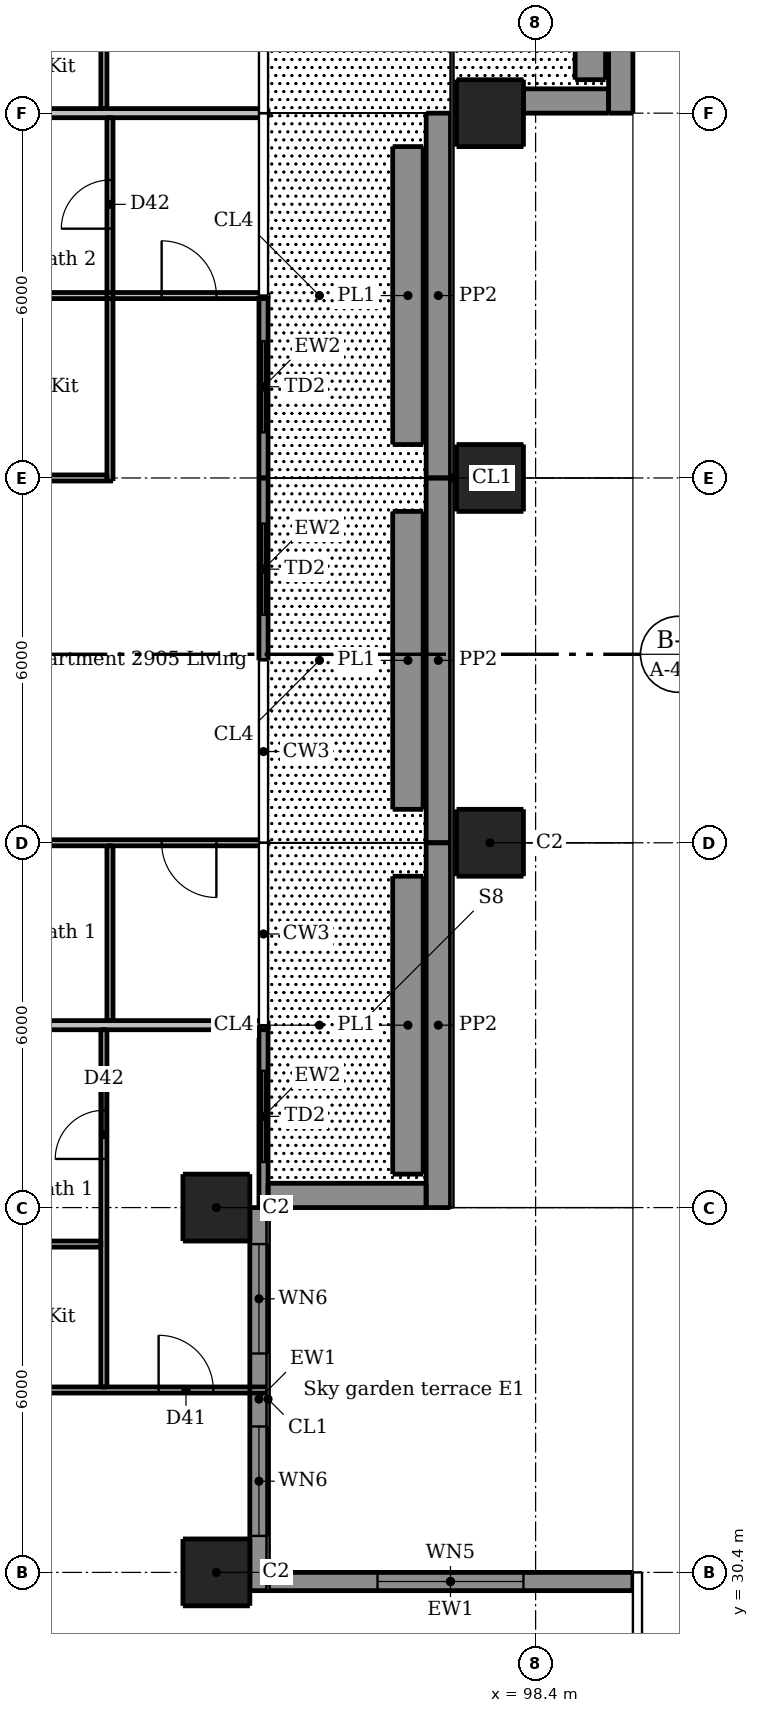
"""IFC4 building model, lengths in metres.
Left out: names, types, materials, properties, quantities, classifications, styles, units other than length and angle.
Written with IfcOpenShell. Run it as: python <this file> out.ifc"""

import sys

from ifc_helpers import new_model, si_unit, direction, frame, frame_2d, origin, origin_2d, place, context, subcontext, project, spatial, rectangle, extrude, element, fill, save


model = new_model("IFC4")
c1 = context("Model", 3, precision=1e-05, world=origin(), true_north=direction((0.0, 1.0)))
c2 = subcontext(c1, "Body", "Model", "MODEL_VIEW")
j1 = project(units=[si_unit("LENGTHUNIT", "METRE"), si_unit("PLANEANGLEUNIT", "RADIAN")], contexts=[c1])
p1 = place(None, origin())
s1 = spatial("IfcSite", under=j1, at=p1, CompositionType="ELEMENT")
p2 = place(p1, origin())
s2 = spatial("IfcBuilding", under=s1, at=p2, CompositionType="ELEMENT")
p3 = place(p2, frame((0.0, 0.0, 108.4)))
s3 = spatial("IfcBuildingStorey", under=s2, at=p3, CompositionType="ELEMENT", Elevation=108.4)
for number, where, z_axis, x_axis in (
    (1, (93.15, 30.4, 0.0), (0.0, 0.0, 1.0), (1.0, 0.0, 0.0)),
    (2, (93.15, 36.4, 0.0), (0.0, 0.0, 1.0), (1.0, 0.0, 0.0)),
):
    element("IfcColumn", number, at=place(p3, frame(where, z_axis=z_axis, x_axis=x_axis)), inside=s3, PredefinedType="COLUMN", context=c2, shape_type="SweptSolid", body=[
        extrude(rectangle(XDim=1.1, YDim=1.1, at=origin_2d()), origin(), (0.0, 0.0, 1.0), 3.05),
    ])
for number, where, z_axis, x_axis in (
    (3, (97.65, 42.4, 0.0), (0.0, 0.0, 1.0), (1.0, 0.0, 0.0)),
    (4, (97.65, 48.4, 0.0), (0.0, 0.0, 1.0), (1.0, 0.0, 0.0)),
    (5, (97.65, 54.4, 0.0), (0.0, 0.0, 1.0), (1.0, 0.0, 0.0)),
):
    element("IfcColumn", number, at=place(p3, frame(where, z_axis=z_axis, x_axis=x_axis)), inside=s3, PredefinedType="COLUMN", context=c2, shape_type="SweptSolid", body=[
        extrude(rectangle(XDim=1.1, YDim=1.1, at=origin_2d()), origin(), (0.0, 0.0, 1.0), 3.3),
    ])
p4 = place(p3, frame((100.0, 30.25, 0.0), z_axis=(0.0, 0.0, 1.0), x_axis=(-1.0, 0.0, 0.0)))
e6 = element("IfcWall", 6, at=p4, inside=s3, PredefinedType="SOLIDWALL", context=c2, shape_type="SweptSolid", body=[
    extrude(rectangle(XDim=6.0, YDim=0.3, at=frame_2d((3.0, 0.0))), origin(), (0.0, 0.0, 1.0), 3.05),
])
p5 = place(p4, frame((1.8, 0.0, 0.15)))
e7 = element("IfcOpeningElement", 7, at=p5, cuts=e6, PredefinedType="OPENING", context=c2, shape_type="SweptSolid", body=[
    extrude(rectangle(XDim=2.4, YDim=2.1, at=frame_2d((1.2, 1.05))), frame((0.0, 0.16, 0.0), z_axis=(0.0, -1.0, 0.0), x_axis=(1.0, 0.0, 0.0)), (0.0, 0.0, 1.0), 0.32),
])
p6 = place(p3, frame((93.85, 30.1, 0.0), z_axis=(0.0, 0.0, 1.0), x_axis=(0.0, 1.0, 0.0)))
e8 = element("IfcWall", 8, at=p6, inside=s3, PredefinedType="SOLIDWALL", context=c2, shape_type="SweptSolid", body=[
    extrude(rectangle(XDim=6.3, YDim=0.3, at=frame_2d((3.15, 0.0))), origin(), (0.0, 0.0, 1.0), 3.05),
])
p7 = place(p6, frame((0.9, 0.0, 0.15)))
e9 = element("IfcOpeningElement", 9, at=p7, cuts=e8, PredefinedType="OPENING", context=c2, shape_type="SweptSolid", body=[
    extrude(rectangle(XDim=1.8, YDim=2.1, at=frame_2d((0.9, 1.05))), frame((0.0, 0.16, 0.0), z_axis=(0.0, -1.0, 0.0), x_axis=(1.0, 0.0, 0.0)), (0.0, 0.0, 1.0), 0.32),
])
p8 = place(p6, frame((3.9, 0.0, 0.15)))
e10 = element("IfcOpeningElement", 10, at=p8, cuts=e8, PredefinedType="OPENING", context=c2, shape_type="SweptSolid", body=[
    extrude(rectangle(XDim=1.8, YDim=2.1, at=frame_2d((0.9, 1.05))), frame((0.0, 0.16, 0.0), z_axis=(0.0, -1.0, 0.0), x_axis=(1.0, 0.0, 0.0)), (0.0, 0.0, 1.0), 0.32),
])
p9 = place(p3, frame((93.925, 36.4, 0.0), z_axis=(0.0, 0.0, 1.0), x_axis=(0.0, 1.0, 0.0)))
e11 = element("IfcWall", 11, at=p9, inside=s3, PredefinedType="SOLIDWALL", context=c2, shape_type="SweptSolid", body=[
    extrude(rectangle(XDim=3.0, YDim=0.15, at=frame_2d((1.5, 0.0))), origin(), (0.0, 0.0, 1.0), 3.05),
])
p10 = place(p9, frame((0.75, 0.0, 0.0)))
e12 = element("IfcOpeningElement", 12, at=p10, cuts=e11, PredefinedType="OPENING", context=c2, shape_type="SweptSolid", body=[
    extrude(rectangle(XDim=1.5, YDim=2.4, at=frame_2d((0.75, 1.2))), frame((0.0, 0.085, 0.0), z_axis=(0.0, -1.0, 0.0), x_axis=(1.0, 0.0, 0.0)), (0.0, 0.0, 1.0), 0.17),
])
p11 = place(p3, frame((93.925, 45.4, 0.0), z_axis=(0.0, 0.0, 1.0), x_axis=(0.0, 1.0, 0.0)))
e13 = element("IfcWall", 13, at=p11, inside=s3, PredefinedType="SOLIDWALL", context=c2, shape_type="SweptSolid", body=[
    extrude(rectangle(XDim=3.0, YDim=0.15, at=frame_2d((1.5, 0.0))), origin(), (0.0, 0.0, 1.0), 3.05),
])
p12 = place(p11, frame((0.75, 0.0, 0.0)))
e14 = element("IfcOpeningElement", 14, at=p12, cuts=e13, PredefinedType="OPENING", context=c2, shape_type="SweptSolid", body=[
    extrude(rectangle(XDim=1.5, YDim=2.4, at=frame_2d((0.75, 1.2))), frame((0.0, 0.085, 0.0), z_axis=(0.0, -1.0, 0.0), x_axis=(1.0, 0.0, 0.0)), (0.0, 0.0, 1.0), 0.17),
])
p13 = place(p3, frame((93.925, 48.4, 0.0), z_axis=(0.0, 0.0, 1.0), x_axis=(0.0, 1.0, 0.0)))
e15 = element("IfcWall", 15, at=p13, inside=s3, PredefinedType="SOLIDWALL", context=c2, shape_type="SweptSolid", body=[
    extrude(rectangle(XDim=3.0, YDim=0.15, at=frame_2d((1.5, 0.0))), origin(), (0.0, 0.0, 1.0), 3.05),
])
p14 = place(p13, frame((0.75, 0.0, 0.0)))
e16 = element("IfcOpeningElement", 16, at=p14, cuts=e15, PredefinedType="OPENING", context=c2, shape_type="SweptSolid", body=[
    extrude(rectangle(XDim=1.5, YDim=2.4, at=frame_2d((0.75, 1.2))), frame((0.0, 0.085, 0.0), z_axis=(0.0, -1.0, 0.0), x_axis=(1.0, 0.0, 0.0)), (0.0, 0.0, 1.0), 0.17),
])
p15 = place(p3, frame((96.8, 36.4, 0.03), z_axis=(0.0, 0.0, 1.0), x_axis=(0.0, 1.0, 0.0)))
e17 = element("IfcWall", 17, at=p15, inside=s3, PredefinedType="PARAPET", context=c2, shape_type="SweptSolid", body=[
    extrude(rectangle(XDim=6.0, YDim=0.4, at=frame_2d((3.0, 0.0))), origin(), (0.0, 0.0, 1.0), 1.1),
])
p16 = place(p3, frame((94.0, 36.6, 0.03), z_axis=(0.0, 0.0, 1.0), x_axis=(1.0, 0.0, 0.0)))
e18 = element("IfcWall", 18, at=p16, inside=s3, PredefinedType="PARAPET", context=c2, shape_type="SweptSolid", body=[
    extrude(rectangle(XDim=2.6, YDim=0.4, at=frame_2d((1.3, 0.0))), origin(), (0.0, 0.0, 1.0), 1.1),
])
p17 = place(p3, frame((96.3, 36.95, 0.03), z_axis=(0.0, 0.0, 1.0), x_axis=(0.0, 1.0, 0.0)))
e19 = element("IfcWall", 19, at=p17, inside=s3, PredefinedType="SOLIDWALL", context=c2, shape_type="SweptSolid", body=[
    extrude(rectangle(XDim=4.9, YDim=0.5, at=frame_2d((2.45, 0.0))), origin(), (0.0, 0.0, 1.0), 0.6),
])
p18 = place(p3, frame((96.8, 42.4, 0.03), z_axis=(0.0, 0.0, 1.0), x_axis=(0.0, 1.0, 0.0)))
e20 = element("IfcWall", 20, at=p18, inside=s3, PredefinedType="PARAPET", context=c2, shape_type="SweptSolid", body=[
    extrude(rectangle(XDim=6.0, YDim=0.4, at=frame_2d((3.0, 0.0))), origin(), (0.0, 0.0, 1.0), 1.1),
])
p19 = place(p3, frame((96.3, 42.95, 0.03), z_axis=(0.0, 0.0, 1.0), x_axis=(0.0, 1.0, 0.0)))
e21 = element("IfcWall", 21, at=p19, inside=s3, PredefinedType="SOLIDWALL", context=c2, shape_type="SweptSolid", body=[
    extrude(rectangle(XDim=4.9, YDim=0.5, at=frame_2d((2.45, 0.0))), origin(), (0.0, 0.0, 1.0), 0.6),
])
p20 = place(p3, frame((96.8, 48.4, 0.03), z_axis=(0.0, 0.0, 1.0), x_axis=(0.0, 1.0, 0.0)))
e22 = element("IfcWall", 22, at=p20, inside=s3, PredefinedType="PARAPET", context=c2, shape_type="SweptSolid", body=[
    extrude(rectangle(XDim=6.0, YDim=0.4, at=frame_2d((3.0, 0.0))), origin(), (0.0, 0.0, 1.0), 1.1),
])
p21 = place(p3, frame((96.3, 48.95, 0.03), z_axis=(0.0, 0.0, 1.0), x_axis=(0.0, 1.0, 0.0)))
e23 = element("IfcWall", 23, at=p21, inside=s3, PredefinedType="SOLIDWALL", context=c2, shape_type="SweptSolid", body=[
    extrude(rectangle(XDim=4.9, YDim=0.5, at=frame_2d((2.45, 0.0))), origin(), (0.0, 0.0, 1.0), 0.6),
])
p22 = place(p3, frame((99.8, 54.4, 0.03), z_axis=(0.0, 0.0, 1.0), x_axis=(0.0, 1.0, 0.0)))
e24 = element("IfcWall", 24, at=p22, inside=s3, PredefinedType="PARAPET", context=c2, shape_type="SweptSolid", body=[
    extrude(rectangle(XDim=5.45, YDim=0.4, at=frame_2d((2.725, 0.0))), origin(), (0.0, 0.0, 1.0), 1.1),
])
p23 = place(p3, frame((98.2, 54.6, 0.03), z_axis=(0.0, 0.0, 1.0), x_axis=(1.0, 0.0, 0.0)))
e25 = element("IfcWall", 25, at=p23, inside=s3, PredefinedType="PARAPET", context=c2, shape_type="SweptSolid", body=[
    extrude(rectangle(XDim=1.4, YDim=0.4, at=frame_2d((0.7, 0.0))), origin(), (0.0, 0.0, 1.0), 1.1),
])
p24 = place(p3, frame((99.3, 54.95, 0.03), z_axis=(0.0, 0.0, 1.0), x_axis=(0.0, 1.0, 0.0)))
e26 = element("IfcWall", 26, at=p24, inside=s3, PredefinedType="SOLIDWALL", context=c2, shape_type="SweptSolid", body=[
    extrude(rectangle(XDim=4.9, YDim=0.5, at=frame_2d((2.45, 0.0))), origin(), (0.0, 0.0, 1.0), 0.6),
])
p25 = place(p3, frame((91.3, 33.45, 0.0), z_axis=(0.0, 0.0, 1.0), x_axis=(0.0, 1.0, 0.0)))
e27 = element("IfcWall", 27, at=p25, inside=s3, PredefinedType="PARTITIONING", context=c2, shape_type="SweptSolid", body=[
    extrude(rectangle(XDim=5.875, YDim=0.1, at=frame_2d((2.938, 0.0))), origin(), (0.0, 0.0, 1.0), 3.05),
])
p26 = place(p25, frame((3.75, 0.0, 0.0)))
e28 = element("IfcOpeningElement", 28, at=p26, cuts=e27, PredefinedType="OPENING", context=c2, shape_type="SweptSolid", body=[
    extrude(rectangle(XDim=0.8, YDim=2.1, at=frame_2d((0.4, 1.05))), frame((0.0, 0.06, 0.0), z_axis=(0.0, -1.0, 0.0), x_axis=(1.0, 0.0, 0.0)), (0.0, 0.0, 1.0), 0.12),
])
p27 = place(p3, frame((91.3, 54.475, 0.0), z_axis=(0.0, 0.0, 1.0), x_axis=(0.0, 1.0, 0.0)))
e29 = element("IfcWall", 29, at=p27, inside=s3, PredefinedType="PARTITIONING", context=c2, shape_type="SweptSolid", body=[
    extrude(rectangle(XDim=2.075, YDim=0.1, at=frame_2d((1.038, 0.0))), origin(), (0.0, 0.0, 1.0), 3.05),
])
p28 = place(p3, frame((91.4, 39.475, 0.0), z_axis=(0.0, 0.0, 1.0), x_axis=(0.0, 1.0, 0.0)))
e30 = element("IfcWall", 30, at=p28, inside=s3, PredefinedType="PARTITIONING", context=c2, shape_type="SweptSolid", body=[
    extrude(rectangle(XDim=2.875, YDim=0.1, at=frame_2d((1.438, 0.0))), origin(), (0.0, 0.0, 1.0), 3.05),
])
p29 = place(p3, frame((91.4, 48.35, 0.0), z_axis=(0.0, 0.0, 1.0), x_axis=(0.0, 1.0, 0.0)))
e31 = element("IfcWall", 31, at=p29, inside=s3, PredefinedType="PARTITIONING", context=c2, shape_type="SweptSolid", body=[
    extrude(rectangle(XDim=5.975, YDim=0.1, at=frame_2d((2.987, 0.0))), origin(), (0.0, 0.0, 1.0), 3.05),
])
p30 = place(p29, frame((4.15, 0.0, 0.0)))
e32 = element("IfcOpeningElement", 32, at=p30, cuts=e31, PredefinedType="OPENING", context=c2, shape_type="SweptSolid", body=[
    extrude(rectangle(XDim=0.8, YDim=2.1, at=frame_2d((0.4, 1.05))), frame((0.0, 0.06, 0.0), z_axis=(0.0, -1.0, 0.0), x_axis=(1.0, 0.0, 0.0)), (0.0, 0.0, 1.0), 0.12),
])
p31 = place(p3, frame((88.375, 51.4, 0.0), z_axis=(0.0, 0.0, 1.0), x_axis=(1.0, 0.0, 0.0)))
e33 = element("IfcWall", 33, at=p31, inside=s3, PredefinedType="PARTITIONING", context=c2, shape_type="SweptSolid", body=[
    extrude(rectangle(XDim=5.625, YDim=0.1, at=frame_2d((2.812, 0.0))), origin(), (0.0, 0.0, 1.0), 3.05),
])
p32 = place(p31, frame((3.875, 0.0, 0.0)))
e34 = element("IfcOpeningElement", 34, at=p32, cuts=e33, PredefinedType="OPENING", context=c2, shape_type="SweptSolid", body=[
    extrude(rectangle(XDim=0.9, YDim=2.1, at=frame_2d((0.45, 1.05))), frame((0.0, 0.06, 0.0), z_axis=(0.0, -1.0, 0.0), x_axis=(1.0, 0.0, 0.0)), (0.0, 0.0, 1.0), 0.12),
])
p33 = place(p3, frame((88.375, 48.4, 0.0), z_axis=(0.0, 0.0, 1.0), x_axis=(1.0, 0.0, 0.0)))
e35 = element("IfcWall", 35, at=p33, inside=s3, PredefinedType="PARTITIONING", context=c2, shape_type="SweptSolid", body=[
    extrude(rectangle(XDim=2.975, YDim=0.1, at=frame_2d((1.488, 0.0))), origin(), (0.0, 0.0, 1.0), 2.516),
])
p34 = place(p33, frame((1.025, 0.0, 0.0)))
e36 = element("IfcOpeningElement", 36, at=p34, cuts=e35, PredefinedType="OPENING", context=c2, shape_type="SweptSolid", body=[
    extrude(rectangle(XDim=0.9, YDim=2.1, at=frame_2d((0.45, 1.05))), frame((0.0, 0.06, 0.0), z_axis=(0.0, -1.0, 0.0), x_axis=(1.0, 0.0, 0.0)), (0.0, 0.0, 1.0), 0.12),
])
p35 = place(p3, frame((94.0, 42.4, 0.0), z_axis=(0.0, 0.0, 1.0), x_axis=(-1.0, 0.0, 0.0)))
e37 = element("IfcWall", 37, at=p35, inside=s3, PredefinedType="PARTITIONING", context=c2, shape_type="SweptSolid", body=[
    extrude(rectangle(XDim=5.625, YDim=0.1, at=frame_2d((2.812, 0.0))), origin(), (0.0, 0.0, 1.0), 2.516),
])
p36 = place(p35, frame((0.85, 0.0, 0.0)))
e38 = element("IfcOpeningElement", 38, at=p36, cuts=e37, PredefinedType="OPENING", context=c2, shape_type="SweptSolid", body=[
    extrude(rectangle(XDim=0.9, YDim=2.1, at=frame_2d((0.45, 1.05))), frame((0.0, 0.06, 0.0), z_axis=(0.0, -1.0, 0.0), x_axis=(1.0, 0.0, 0.0)), (0.0, 0.0, 1.0), 0.12),
])
p37 = place(p35, frame((3.75, 0.0, 0.0)))
e39 = element("IfcOpeningElement", 39, at=p37, cuts=e37, PredefinedType="OPENING", context=c2, shape_type="SweptSolid", body=[
    extrude(rectangle(XDim=0.8, YDim=2.1, at=frame_2d((0.4, 1.05))), frame((0.0, 0.06, 0.0), z_axis=(0.0, -1.0, 0.0), x_axis=(1.0, 0.0, 0.0)), (0.0, 0.0, 1.0), 0.12),
])
p38 = place(p3, frame((88.375, 35.8, 0.0), z_axis=(0.0, 0.0, 1.0), x_axis=(1.0, 0.0, 0.0)))
e40 = element("IfcWall", 40, at=p38, inside=s3, PredefinedType="PARTITIONING", context=c2, shape_type="SweptSolid", body=[
    extrude(rectangle(XDim=2.875, YDim=0.1, at=frame_2d((1.438, 0.0))), origin(), (0.0, 0.0, 1.0), 3.05),
])
p39 = place(p3, frame((88.375, 33.4, 0.0), z_axis=(0.0, 0.0, 1.0), x_axis=(1.0, 0.0, 0.0)))
e41 = element("IfcWall", 41, at=p39, inside=s3, PredefinedType="PARTITIONING", context=c2, shape_type="SweptSolid", body=[
    extrude(rectangle(XDim=5.625, YDim=0.1, at=frame_2d((2.812, 0.0))), origin(), (0.0, 0.0, 1.0), 3.05),
])
p40 = place(p39, frame((0.975, 0.0, 0.0)))
e42 = element("IfcOpeningElement", 42, at=p40, cuts=e41, PredefinedType="OPENING", context=c2, shape_type="SweptSolid", body=[
    extrude(rectangle(XDim=0.9, YDim=2.1, at=frame_2d((0.45, 1.05))), frame((0.0, 0.06, 0.0), z_axis=(0.0, -1.0, 0.0), x_axis=(1.0, 0.0, 0.0)), (0.0, 0.0, 1.0), 0.12),
])
p41 = place(p39, frame((3.825, 0.0, 0.0)))
e43 = element("IfcOpeningElement", 43, at=p41, cuts=e41, PredefinedType="OPENING", context=c2, shape_type="SweptSolid", body=[
    extrude(rectangle(XDim=0.9, YDim=2.1, at=frame_2d((0.45, 1.05))), frame((0.0, 0.06, 0.0), z_axis=(0.0, -1.0, 0.0), x_axis=(1.0, 0.0, 0.0)), (0.0, 0.0, 1.0), 0.12),
])
p42 = place(p3, frame((88.375, 54.4, 0.0), z_axis=(0.0, 0.0, 1.0), x_axis=(1.0, 0.0, 0.0)))
e44 = element("IfcWall", 44, at=p42, inside=s3, PredefinedType="PARTITIONING", context=c2, shape_type="SweptSolid", body=[
    extrude(rectangle(XDim=5.625, YDim=0.15, at=frame_2d((2.812, 0.0))), origin(), (0.0, 0.0, 1.0), 2.516),
])
p43 = place(p3, frame((88.375, 39.4, 0.0), z_axis=(0.0, 0.0, 1.0), x_axis=(1.0, 0.0, 0.0)))
e45 = element("IfcWall", 45, at=p43, inside=s3, PredefinedType="PARTITIONING", context=c2, shape_type="SweptSolid", body=[
    extrude(rectangle(XDim=5.625, YDim=0.15, at=frame_2d((2.812, 0.0))), origin(), (0.0, 0.0, 1.0), 3.05),
])
p44 = place(p5, origin())
e46 = element("IfcWindow", 46, at=p44, inside=s3, PartitioningType="DOUBLE_PANEL_VERTICAL", PredefinedType="WINDOW", context=c2, shape_type="SweptSolid", body=[
    extrude(rectangle(XDim=2.4, YDim=2.1, at=frame_2d((1.2, 1.05))), frame((0.0, 0.03, 0.0), z_axis=(0.0, -1.0, 0.0), x_axis=(1.0, 0.0, 0.0)), (0.0, 0.0, 1.0), 0.06),
])
fill(e7, e46)
p45 = place(p7, origin())
e47 = element("IfcWindow", 47, at=p45, inside=s3, PartitioningType="DOUBLE_PANEL_VERTICAL", PredefinedType="WINDOW", context=c2, shape_type="SweptSolid", body=[
    extrude(rectangle(XDim=1.8, YDim=2.1, at=frame_2d((0.9, 1.05))), frame((0.0, 0.03, 0.0), z_axis=(0.0, -1.0, 0.0), x_axis=(1.0, 0.0, 0.0)), (0.0, 0.0, 1.0), 0.06),
])
fill(e9, e47)
p46 = place(p8, origin())
e48 = element("IfcWindow", 48, at=p46, inside=s3, PartitioningType="DOUBLE_PANEL_VERTICAL", PredefinedType="WINDOW", context=c2, shape_type="SweptSolid", body=[
    extrude(rectangle(XDim=1.8, YDim=2.1, at=frame_2d((0.9, 1.05))), frame((0.0, 0.03, 0.0), z_axis=(0.0, -1.0, 0.0), x_axis=(1.0, 0.0, 0.0)), (0.0, 0.0, 1.0), 0.06),
])
fill(e10, e48)
p47 = place(p10, origin())
e49 = element("IfcDoor", 49, at=p47, inside=s3, OperationType="DOUBLE_DOOR_SLIDING", PredefinedType="DOOR", context=c2, shape_type="SweptSolid", body=[
    extrude(rectangle(XDim=1.5, YDim=2.4, at=frame_2d((0.75, 1.2))), frame((0.0, 0.025, 0.0), z_axis=(0.0, -1.0, 0.0), x_axis=(1.0, 0.0, 0.0)), (0.0, 0.0, 1.0), 0.05),
])
fill(e12, e49)
p48 = place(p12, origin())
e50 = element("IfcDoor", 50, at=p48, inside=s3, OperationType="DOUBLE_DOOR_SLIDING", PredefinedType="DOOR", context=c2, shape_type="SweptSolid", body=[
    extrude(rectangle(XDim=1.5, YDim=2.4, at=frame_2d((0.75, 1.2))), frame((0.0, 0.025, 0.0), z_axis=(0.0, -1.0, 0.0), x_axis=(1.0, 0.0, 0.0)), (0.0, 0.0, 1.0), 0.05),
])
fill(e14, e50)
p49 = place(p14, origin())
e51 = element("IfcDoor", 51, at=p49, inside=s3, OperationType="DOUBLE_DOOR_SLIDING", PredefinedType="DOOR", context=c2, shape_type="SweptSolid", body=[
    extrude(rectangle(XDim=1.5, YDim=2.4, at=frame_2d((0.75, 1.2))), frame((0.0, 0.025, 0.0), z_axis=(0.0, -1.0, 0.0), x_axis=(1.0, 0.0, 0.0)), (0.0, 0.0, 1.0), 0.05),
])
fill(e16, e51)
p50 = place(p41, origin())
e52 = element("IfcDoor", 52, at=p50, inside=s3, OperationType="SINGLE_SWING_LEFT", PredefinedType="DOOR", context=c2, shape_type="SweptSolid", body=[
    extrude(rectangle(XDim=0.9, YDim=2.1, at=frame_2d((0.45, 1.05))), frame((0.0, 0.025, 0.0), z_axis=(0.0, -1.0, 0.0), x_axis=(1.0, 0.0, 0.0)), (0.0, 0.0, 1.0), 0.05),
])
fill(e43, e52)
p51 = place(p26, origin())
e53 = element("IfcDoor", 53, at=p51, inside=s3, OperationType="SINGLE_SWING_LEFT", PredefinedType="DOOR", context=c2, shape_type="SweptSolid", body=[
    extrude(rectangle(XDim=0.8, YDim=2.1, at=frame_2d((0.4, 1.05))), frame((0.0, 0.025, 0.0), z_axis=(0.0, -1.0, 0.0), x_axis=(1.0, 0.0, 0.0)), (0.0, 0.0, 1.0), 0.05),
])
fill(e28, e53)
p52 = place(p36, origin())
e54 = element("IfcDoor", 54, at=p52, inside=s3, OperationType="SINGLE_SWING_LEFT", PredefinedType="DOOR", context=c2, shape_type="SweptSolid", body=[
    extrude(rectangle(XDim=0.9, YDim=2.1, at=frame_2d((0.45, 1.05))), frame((0.0, 0.025, 0.0), z_axis=(0.0, -1.0, 0.0), x_axis=(1.0, 0.0, 0.0)), (0.0, 0.0, 1.0), 0.05),
])
fill(e38, e54)
p53 = place(p32, origin())
e55 = element("IfcDoor", 55, at=p53, inside=s3, OperationType="SINGLE_SWING_LEFT", PredefinedType="DOOR", context=c2, shape_type="SweptSolid", body=[
    extrude(rectangle(XDim=0.9, YDim=2.1, at=frame_2d((0.45, 1.05))), frame((0.0, 0.025, 0.0), z_axis=(0.0, -1.0, 0.0), x_axis=(1.0, 0.0, 0.0)), (0.0, 0.0, 1.0), 0.05),
])
fill(e34, e55)
p54 = place(p30, origin())
e56 = element("IfcDoor", 56, at=p54, inside=s3, OperationType="SINGLE_SWING_LEFT", PredefinedType="DOOR", context=c2, shape_type="SweptSolid", body=[
    extrude(rectangle(XDim=0.8, YDim=2.1, at=frame_2d((0.4, 1.05))), frame((0.0, 0.025, 0.0), z_axis=(0.0, -1.0, 0.0), x_axis=(1.0, 0.0, 0.0)), (0.0, 0.0, 1.0), 0.05),
])
fill(e32, e56)
save(model, sys.argv[1])
